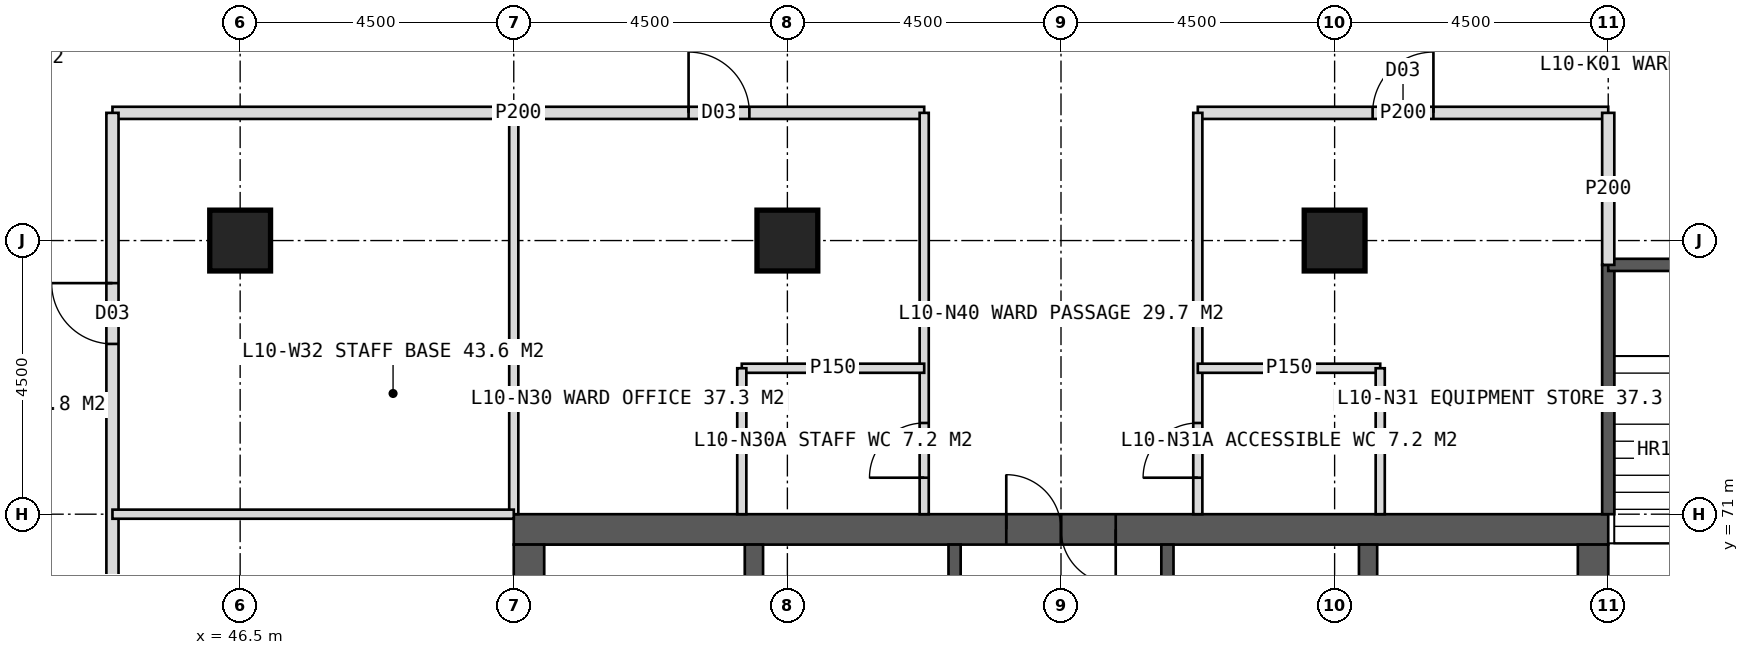
"""IFC4 building model, lengths in metres.
Left out: names, types, materials, properties, quantities, classifications, styles, units other than length and angle.
Written with IfcOpenShell. Run it as: python <this file> out.ifc"""

import sys

from ifc_helpers import new_model, si_unit, direction, frame, frame_2d, origin, origin_2d, place, context, subcontext, project, spatial, rectangle, hollow_rectangle, extrude, element, fill, save


model = new_model("IFC4")
c1 = context("Model", 3, precision=1e-05, world=origin(), true_north=direction((0.0, 1.0)))
c2 = subcontext(c1, "Body", "Model", "MODEL_VIEW")
j1 = project(units=[si_unit("LENGTHUNIT", "METRE"), si_unit("PLANEANGLEUNIT", "RADIAN")], contexts=[c1])
p1 = place(None, origin())
s1 = spatial("IfcSite", under=j1, at=p1, CompositionType="ELEMENT")
p2 = place(p1, origin())
s2 = spatial("IfcBuilding", under=s1, at=p2, CompositionType="ELEMENT")
p3 = place(p2, frame((0.0, 0.0, 47.0)))
s3 = spatial("IfcBuildingStorey", under=s2, at=p3, CompositionType="ELEMENT", Elevation=47.0)
p4 = place(p3, frame((51.0, 70.75, 0.0), z_axis=(0.0, 0.0, 1.0), x_axis=(1.0, 0.0, 0.0)))
e1 = element("IfcWall", 1, at=p4, inside=s3, PredefinedType="SHEAR", context=c2, shape_type="SweptSolid", body=[
    extrude(rectangle(XDim=18.0, YDim=0.5, at=frame_2d((9.0, 0.0))), origin(), (0.0, 0.0, 1.0), 4.0),
])
p5 = place(p4, frame((8.1, 0.0, 0.0)))
e2 = element("IfcOpeningElement", 2, at=p5, cuts=e1, PredefinedType="OPENING", context=c2, shape_type="SweptSolid", body=[
    extrude(rectangle(XDim=1.8, YDim=2.2, at=frame_2d((0.9, 1.1))), frame((0.0, 0.26, 0.0), z_axis=(0.0, -1.0, 0.0), x_axis=(1.0, 0.0, 0.0)), (0.0, 0.0, 1.0), 0.52),
])
p6 = place(p3, frame((51.25, 53.5, 0.0), z_axis=(0.0, 0.0, 1.0), x_axis=(0.0, 1.0, 0.0)))
e3 = element("IfcWall", 3, at=p6, inside=s3, PredefinedType="SHEAR", context=c2, shape_type="SweptSolid", body=[
    extrude(rectangle(XDim=17.0, YDim=0.5, at=frame_2d((8.5, 0.0))), origin(), (0.0, 0.0, 1.0), 4.0),
])
p7 = place(p6, frame((6.0, 0.0, 0.0)))
e4 = element("IfcOpeningElement", 4, at=p7, cuts=e3, PredefinedType="OPENING", context=c2, shape_type="SweptSolid", body=[
    extrude(rectangle(XDim=1.5, YDim=2.2, at=frame_2d((0.75, 1.1))), frame((0.0, 0.26, 0.0), z_axis=(0.0, -1.0, 0.0), x_axis=(1.0, 0.0, 0.0)), (0.0, 0.0, 1.0), 0.52),
])
p8 = place(p3, frame((68.75, 53.5, 0.0), z_axis=(0.0, 0.0, 1.0), x_axis=(0.0, 1.0, 0.0)))
e5 = element("IfcWall", 5, at=p8, inside=s3, PredefinedType="SHEAR", context=c2, shape_type="SweptSolid", body=[
    extrude(rectangle(XDim=17.0, YDim=0.5, at=frame_2d((8.5, 0.0))), origin(), (0.0, 0.0, 1.0), 4.0),
])
p9 = place(p8, frame((9.5, 0.0, 0.0)))
e6 = element("IfcOpeningElement", 6, at=p9, cuts=e5, PredefinedType="OPENING", context=c2, shape_type="SweptSolid", body=[
    extrude(rectangle(XDim=1.5, YDim=2.2, at=frame_2d((0.75, 1.1))), frame((0.0, 0.26, 0.0), z_axis=(0.0, -1.0, 0.0), x_axis=(1.0, 0.0, 0.0)), (0.0, 0.0, 1.0), 0.52),
])
for number, where, z_axis, x_axis in (
    (7, (54.95, 53.5, 0.0), (0.0, 0.0, 1.0), (0.0, 1.0, 0.0)),
    (8, (65.05, 53.5, 0.0), (0.0, 0.0, 1.0), (0.0, 1.0, 0.0)),
):
    element("IfcWall", number, at=place(p3, frame(where, z_axis=z_axis, x_axis=x_axis)), inside=s3, PredefinedType="SHEAR", context=c2, shape_type="SweptSolid", body=[
        extrude(rectangle(XDim=17.0, YDim=0.3, at=frame_2d((8.5, 0.0))), origin(), (0.0, 0.0, 1.0), 4.0),
    ])
p10 = place(p3, frame((58.25, 53.5, 0.0), z_axis=(0.0, 0.0, 1.0), x_axis=(0.0, 1.0, 0.0)))
e9 = element("IfcWall", 9, at=p10, inside=s3, PredefinedType="SHEAR", context=c2, shape_type="SweptSolid", body=[
    extrude(rectangle(XDim=17.0, YDim=0.2, at=frame_2d((8.5, 0.0))), origin(), (0.0, 0.0, 1.0), 4.0),
])
p11 = place(p10, frame((1.375, 0.0, 0.0)))
e10 = element("IfcOpeningElement", 10, at=p11, cuts=e9, PredefinedType="OPENING", context=c2, shape_type="SweptSolid", body=[
    extrude(rectangle(XDim=1.4, YDim=2.2, at=frame_2d((0.7, 1.1))), frame((0.0, 0.11, 0.0), z_axis=(0.0, -1.0, 0.0), x_axis=(1.0, 0.0, 0.0)), (0.0, 0.0, 1.0), 0.22),
])
p12 = place(p10, frame((5.675, 0.0, 0.0)))
e11 = element("IfcOpeningElement", 11, at=p12, cuts=e9, PredefinedType="OPENING", context=c2, shape_type="SweptSolid", body=[
    extrude(rectangle(XDim=1.4, YDim=2.2, at=frame_2d((0.7, 1.1))), frame((0.0, 0.11, 0.0), z_axis=(0.0, -1.0, 0.0), x_axis=(1.0, 0.0, 0.0)), (0.0, 0.0, 1.0), 0.22),
])
p13 = place(p3, frame((61.75, 53.5, 0.0), z_axis=(0.0, 0.0, 1.0), x_axis=(0.0, 1.0, 0.0)))
e12 = element("IfcWall", 12, at=p13, inside=s3, PredefinedType="SHEAR", context=c2, shape_type="SweptSolid", body=[
    extrude(rectangle(XDim=17.0, YDim=0.2, at=frame_2d((8.5, 0.0))), origin(), (0.0, 0.0, 1.0), 4.0),
])
p14 = place(p13, frame((1.375, 0.0, 0.0)))
e13 = element("IfcOpeningElement", 13, at=p14, cuts=e12, PredefinedType="OPENING", context=c2, shape_type="SweptSolid", body=[
    extrude(rectangle(XDim=1.4, YDim=2.2, at=frame_2d((0.7, 1.1))), frame((0.0, 0.11, 0.0), z_axis=(0.0, -1.0, 0.0), x_axis=(1.0, 0.0, 0.0)), (0.0, 0.0, 1.0), 0.22),
])
p15 = place(p13, frame((5.675, 0.0, 0.0)))
e14 = element("IfcOpeningElement", 14, at=p15, cuts=e12, PredefinedType="OPENING", context=c2, shape_type="SweptSolid", body=[
    extrude(rectangle(XDim=1.4, YDim=2.2, at=frame_2d((0.7, 1.1))), frame((0.0, 0.11, 0.0), z_axis=(0.0, -1.0, 0.0), x_axis=(1.0, 0.0, 0.0)), (0.0, 0.0, 1.0), 0.22),
])
for number, where, z_axis, x_axis in (
    (15, (46.5, 75.5, 0.0), (0.0, 0.0, 1.0), (1.0, 0.0, 0.0)),
    (16, (55.5, 75.5, 0.0), (0.0, 0.0, 1.0), (1.0, 0.0, 0.0)),
    (17, (64.5, 75.5, 0.0), (0.0, 0.0, 1.0), (1.0, 0.0, 0.0)),
):
    element("IfcColumn", number, at=place(p3, frame(where, z_axis=z_axis, x_axis=x_axis)), inside=s3, PredefinedType="COLUMN", context=c2, shape_type="SweptSolid", body=[
        extrude(hollow_rectangle(XDim=1.0, YDim=1.0, WallThickness=0.1, at=origin_2d()), origin(), (0.0, 0.0, 1.0), 4.0),
    ])
p16 = place(p3, frame((51.0, 71.0, 0.0), z_axis=(0.0, 0.0, 1.0), x_axis=(0.0, 1.0, 0.0)))
e18 = element("IfcWall", 18, at=p16, inside=s3, PredefinedType="PARTITIONING", context=c2, shape_type="SweptSolid", body=[
    extrude(rectangle(XDim=6.6, YDim=0.15, at=frame_2d((3.3, 0.0))), origin(), (0.0, 0.0, 1.0), 3.75),
])
p17 = place(p3, frame((44.4, 77.6, 0.0), z_axis=(0.0, 0.0, 1.0), x_axis=(1.0, 0.0, 0.0)))
e19 = element("IfcWall", 19, at=p17, inside=s3, PredefinedType="PARTITIONING", context=c2, shape_type="SweptSolid", body=[
    extrude(rectangle(XDim=13.35, YDim=0.2, at=frame_2d((6.675, 0.0))), origin(), (0.0, 0.0, 1.0), 3.75),
])
p18 = place(p17, frame((9.475, 0.0, 0.0)))
e20 = element("IfcOpeningElement", 20, at=p18, cuts=e19, PredefinedType="OPENING", context=c2, shape_type="SweptSolid", body=[
    extrude(rectangle(XDim=1.0, YDim=2.1, at=frame_2d((0.5, 1.05))), frame((0.0, 0.11, 0.0), z_axis=(0.0, -1.0, 0.0), x_axis=(1.0, 0.0, 0.0)), (0.0, 0.0, 1.0), 0.22),
])
p19 = place(p3, frame((62.25, 77.6, 0.0), z_axis=(0.0, 0.0, 1.0), x_axis=(1.0, 0.0, 0.0)))
e21 = element("IfcWall", 21, at=p19, inside=s3, PredefinedType="PARTITIONING", context=c2, shape_type="SweptSolid", body=[
    extrude(rectangle(XDim=6.75, YDim=0.2, at=frame_2d((3.375, 0.0))), origin(), (0.0, 0.0, 1.0), 3.75),
])
p20 = place(p19, frame((2.875, 0.0, 0.0)))
e22 = element("IfcOpeningElement", 22, at=p20, cuts=e21, PredefinedType="OPENING", context=c2, shape_type="SweptSolid", body=[
    extrude(rectangle(XDim=1.0, YDim=2.1, at=frame_2d((0.5, 1.05))), frame((0.0, 0.11, 0.0), z_axis=(0.0, -1.0, 0.0), x_axis=(1.0, 0.0, 0.0)), (0.0, 0.0, 1.0), 0.22),
])
p21 = place(p3, frame((57.75, 71.0, 0.0), z_axis=(0.0, 0.0, 1.0), x_axis=(0.0, 1.0, 0.0)))
e23 = element("IfcWall", 23, at=p21, inside=s3, PredefinedType="PARTITIONING", context=c2, shape_type="SweptSolid", body=[
    extrude(rectangle(XDim=6.6, YDim=0.15, at=frame_2d((3.3, 0.0))), origin(), (0.0, 0.0, 1.0), 3.75),
])
p22 = place(p21, frame((0.6, 0.0, 0.0)))
e24 = element("IfcOpeningElement", 24, at=p22, cuts=e23, PredefinedType="OPENING", context=c2, shape_type="SweptSolid", body=[
    extrude(rectangle(XDim=0.9, YDim=2.1, at=frame_2d((0.45, 1.05))), frame((0.0, 0.085, 0.0), z_axis=(0.0, -1.0, 0.0), x_axis=(1.0, 0.0, 0.0)), (0.0, 0.0, 1.0), 0.17),
])
p23 = place(p3, frame((62.25, 71.0, 0.0), z_axis=(0.0, 0.0, 1.0), x_axis=(0.0, 1.0, 0.0)))
e25 = element("IfcWall", 25, at=p23, inside=s3, PredefinedType="PARTITIONING", context=c2, shape_type="SweptSolid", body=[
    extrude(rectangle(XDim=6.6, YDim=0.15, at=frame_2d((3.3, 0.0))), origin(), (0.0, 0.0, 1.0), 3.75),
])
p24 = place(p23, frame((0.6, 0.0, 0.0)))
e26 = element("IfcOpeningElement", 26, at=p24, cuts=e25, PredefinedType="OPENING", context=c2, shape_type="SweptSolid", body=[
    extrude(rectangle(XDim=0.9, YDim=2.1, at=frame_2d((0.45, 1.05))), frame((0.0, 0.085, 0.0), z_axis=(0.0, -1.0, 0.0), x_axis=(1.0, 0.0, 0.0)), (0.0, 0.0, 1.0), 0.17),
])
p25 = place(p3, frame((54.75, 73.4, 0.0), z_axis=(0.0, 0.0, 1.0), x_axis=(1.0, 0.0, 0.0)))
e27 = element("IfcWall", 27, at=p25, inside=s3, PredefinedType="PARTITIONING", context=c2, shape_type="SweptSolid", body=[
    extrude(rectangle(XDim=3.0, YDim=0.15, at=frame_2d((1.5, 0.0))), origin(), (0.0, 0.0, 1.0), 3.75),
])
p26 = place(p3, frame((54.75, 71.0, 0.0), z_axis=(0.0, 0.0, 1.0), x_axis=(0.0, 1.0, 0.0)))
e28 = element("IfcWall", 28, at=p26, inside=s3, PredefinedType="PARTITIONING", context=c2, shape_type="SweptSolid", body=[
    extrude(rectangle(XDim=2.4, YDim=0.15, at=frame_2d((1.2, 0.0))), origin(), (0.0, 0.0, 1.0), 3.75),
])
p27 = place(p3, frame((62.25, 73.4, 0.0), z_axis=(0.0, 0.0, 1.0), x_axis=(1.0, 0.0, 0.0)))
e29 = element("IfcWall", 29, at=p27, inside=s3, PredefinedType="PARTITIONING", context=c2, shape_type="SweptSolid", body=[
    extrude(rectangle(XDim=3.0, YDim=0.15, at=frame_2d((1.5, 0.0))), origin(), (0.0, 0.0, 1.0), 3.75),
])
p28 = place(p3, frame((65.25, 71.0, 0.0), z_axis=(0.0, 0.0, 1.0), x_axis=(0.0, 1.0, 0.0)))
e30 = element("IfcWall", 30, at=p28, inside=s3, PredefinedType="PARTITIONING", context=c2, shape_type="SweptSolid", body=[
    extrude(rectangle(XDim=2.4, YDim=0.15, at=frame_2d((1.2, 0.0))), origin(), (0.0, 0.0, 1.0), 3.75),
])
p29 = place(p3, frame((44.4, 62.0, 0.0), z_axis=(0.0, 0.0, 1.0), x_axis=(0.0, 1.0, 0.0)))
e31 = element("IfcWall", 31, at=p29, inside=s3, PredefinedType="PARTITIONING", context=c2, shape_type="SweptSolid", body=[
    extrude(rectangle(XDim=15.6, YDim=0.2, at=frame_2d((7.8, 0.0))), origin(), (0.0, 0.0, 1.0), 3.75),
])
p30 = place(p29, frame((4.0, 0.0, 0.0)))
e32 = element("IfcOpeningElement", 32, at=p30, cuts=e31, PredefinedType="OPENING", context=c2, shape_type="SweptSolid", body=[
    extrude(rectangle(XDim=1.0, YDim=2.1, at=frame_2d((0.5, 1.05))), frame((0.0, 0.11, 0.0), z_axis=(0.0, -1.0, 0.0), x_axis=(1.0, 0.0, 0.0)), (0.0, 0.0, 1.0), 0.22),
])
p31 = place(p29, frame((11.8, 0.0, 0.0)))
e33 = element("IfcOpeningElement", 33, at=p31, cuts=e31, PredefinedType="OPENING", context=c2, shape_type="SweptSolid", body=[
    extrude(rectangle(XDim=1.0, YDim=2.1, at=frame_2d((0.5, 1.05))), frame((0.0, 0.11, 0.0), z_axis=(0.0, -1.0, 0.0), x_axis=(1.0, 0.0, 0.0)), (0.0, 0.0, 1.0), 0.22),
])
p32 = place(p3, frame((51.0, 71.0, 0.0), z_axis=(0.0, 0.0, 1.0), x_axis=(-1.0, 0.0, 0.0)))
e34 = element("IfcWall", 34, at=p32, inside=s3, PredefinedType="PARTITIONING", context=c2, shape_type="SweptSolid", body=[
    extrude(rectangle(XDim=6.6, YDim=0.15, at=frame_2d((3.3, 0.0))), origin(), (0.0, 0.0, 1.0), 3.75),
])
p33 = place(p3, frame((69.0, 71.0, 0.0), z_axis=(0.0, 0.0, 1.0), x_axis=(0.0, 1.0, 0.0)))
e35 = element("IfcWall", 35, at=p33, inside=s3, PredefinedType="SOLIDWALL", context=c2, shape_type="SweptSolid", body=[
    extrude(rectangle(XDim=4.1, YDim=0.2, at=frame_2d((2.05, 0.0))), origin(), (0.0, 0.0, 1.0), 3.75),
])
p34 = place(p3, frame((69.0, 75.1, 0.0), z_axis=(0.0, 0.0, 1.0), x_axis=(1.0, 0.0, 0.0)))
e36 = element("IfcWall", 36, at=p34, inside=s3, PredefinedType="SOLIDWALL", context=c2, shape_type="SweptSolid", body=[
    extrude(rectangle(XDim=3.5, YDim=0.2, at=frame_2d((1.75, 0.0))), origin(), (0.0, 0.0, 1.0), 3.75),
])
p35 = place(p34, frame((1.15, 0.0, 0.0)))
e37 = element("IfcOpeningElement", 37, at=p35, cuts=e36, PredefinedType="OPENING", context=c2, shape_type="SweptSolid", body=[
    extrude(rectangle(XDim=1.2, YDim=2.1, at=frame_2d((0.6, 1.05))), frame((0.0, 0.11, 0.0), z_axis=(0.0, -1.0, 0.0), x_axis=(1.0, 0.0, 0.0)), (0.0, 0.0, 1.0), 0.22),
])
p36 = place(p3, frame((69.0, 75.1, 0.0), z_axis=(0.0, 0.0, 1.0), x_axis=(0.0, 1.0, 0.0)))
e38 = element("IfcWall", 38, at=p36, inside=s3, PredefinedType="PARTITIONING", context=c2, shape_type="SweptSolid", body=[
    extrude(rectangle(XDim=2.5, YDim=0.2, at=frame_2d((1.25, 0.0))), origin(), (0.0, 0.0, 1.0), 3.75),
])
p37 = place(p22, origin())
e39 = element("IfcDoor", 39, at=p37, inside=s3, OperationType="SINGLE_SWING_LEFT", PredefinedType="DOOR", context=c2, shape_type="SweptSolid", body=[
    extrude(rectangle(XDim=0.9, YDim=2.1, at=frame_2d((0.45, 1.05))), frame((0.0, 0.025, 0.0), z_axis=(0.0, -1.0, 0.0), x_axis=(1.0, 0.0, 0.0)), (0.0, 0.0, 1.0), 0.05),
])
fill(e24, e39)
p38 = place(p18, origin())
e40 = element("IfcDoor", 40, at=p38, inside=s3, OperationType="SINGLE_SWING_LEFT", PredefinedType="DOOR", context=c2, shape_type="SweptSolid", body=[
    extrude(rectangle(XDim=1.0, YDim=2.1, at=frame_2d((0.5, 1.05))), frame((0.0, 0.025, 0.0), z_axis=(0.0, -1.0, 0.0), x_axis=(1.0, 0.0, 0.0)), (0.0, 0.0, 1.0), 0.05),
])
fill(e20, e40)
p39 = place(p24, origin())
e41 = element("IfcDoor", 41, at=p39, inside=s3, OperationType="SINGLE_SWING_LEFT", PredefinedType="DOOR", context=c2, shape_type="SweptSolid", body=[
    extrude(rectangle(XDim=0.9, YDim=2.1, at=frame_2d((0.45, 1.05))), frame((0.0, 0.025, 0.0), z_axis=(0.0, -1.0, 0.0), x_axis=(1.0, 0.0, 0.0)), (0.0, 0.0, 1.0), 0.05),
])
fill(e26, e41)
p40 = place(p20, origin())
e42 = element("IfcDoor", 42, at=p40, inside=s3, OperationType="SINGLE_SWING_RIGHT", PredefinedType="DOOR", context=c2, shape_type="SweptSolid", body=[
    extrude(rectangle(XDim=1.0, YDim=2.1, at=frame_2d((0.5, 1.05))), frame((0.0, 0.025, 0.0), z_axis=(0.0, -1.0, 0.0), x_axis=(1.0, 0.0, 0.0)), (0.0, 0.0, 1.0), 0.05),
])
fill(e22, e42)
p41 = place(p31, origin())
e43 = element("IfcDoor", 43, at=p41, inside=s3, OperationType="SINGLE_SWING_RIGHT", PredefinedType="DOOR", context=c2, shape_type="SweptSolid", body=[
    extrude(rectangle(XDim=1.0, YDim=2.1, at=frame_2d((0.5, 1.05))), frame((0.0, 0.025, 0.0), z_axis=(0.0, -1.0, 0.0), x_axis=(1.0, 0.0, 0.0)), (0.0, 0.0, 1.0), 0.05),
])
fill(e33, e43)
p42 = place(p5, origin())
e44 = element("IfcDoor", 44, at=p42, inside=s3, OperationType="DOUBLE_DOOR_SINGLE_SWING", PredefinedType="DOOR", context=c2, shape_type="SweptSolid", body=[
    extrude(rectangle(XDim=1.8, YDim=2.2, at=frame_2d((0.9, 1.1))), frame((0.0, 0.025, 0.0), z_axis=(0.0, -1.0, 0.0), x_axis=(1.0, 0.0, 0.0)), (0.0, 0.0, 1.0), 0.05),
])
fill(e2, e44)
save(model, sys.argv[1])
